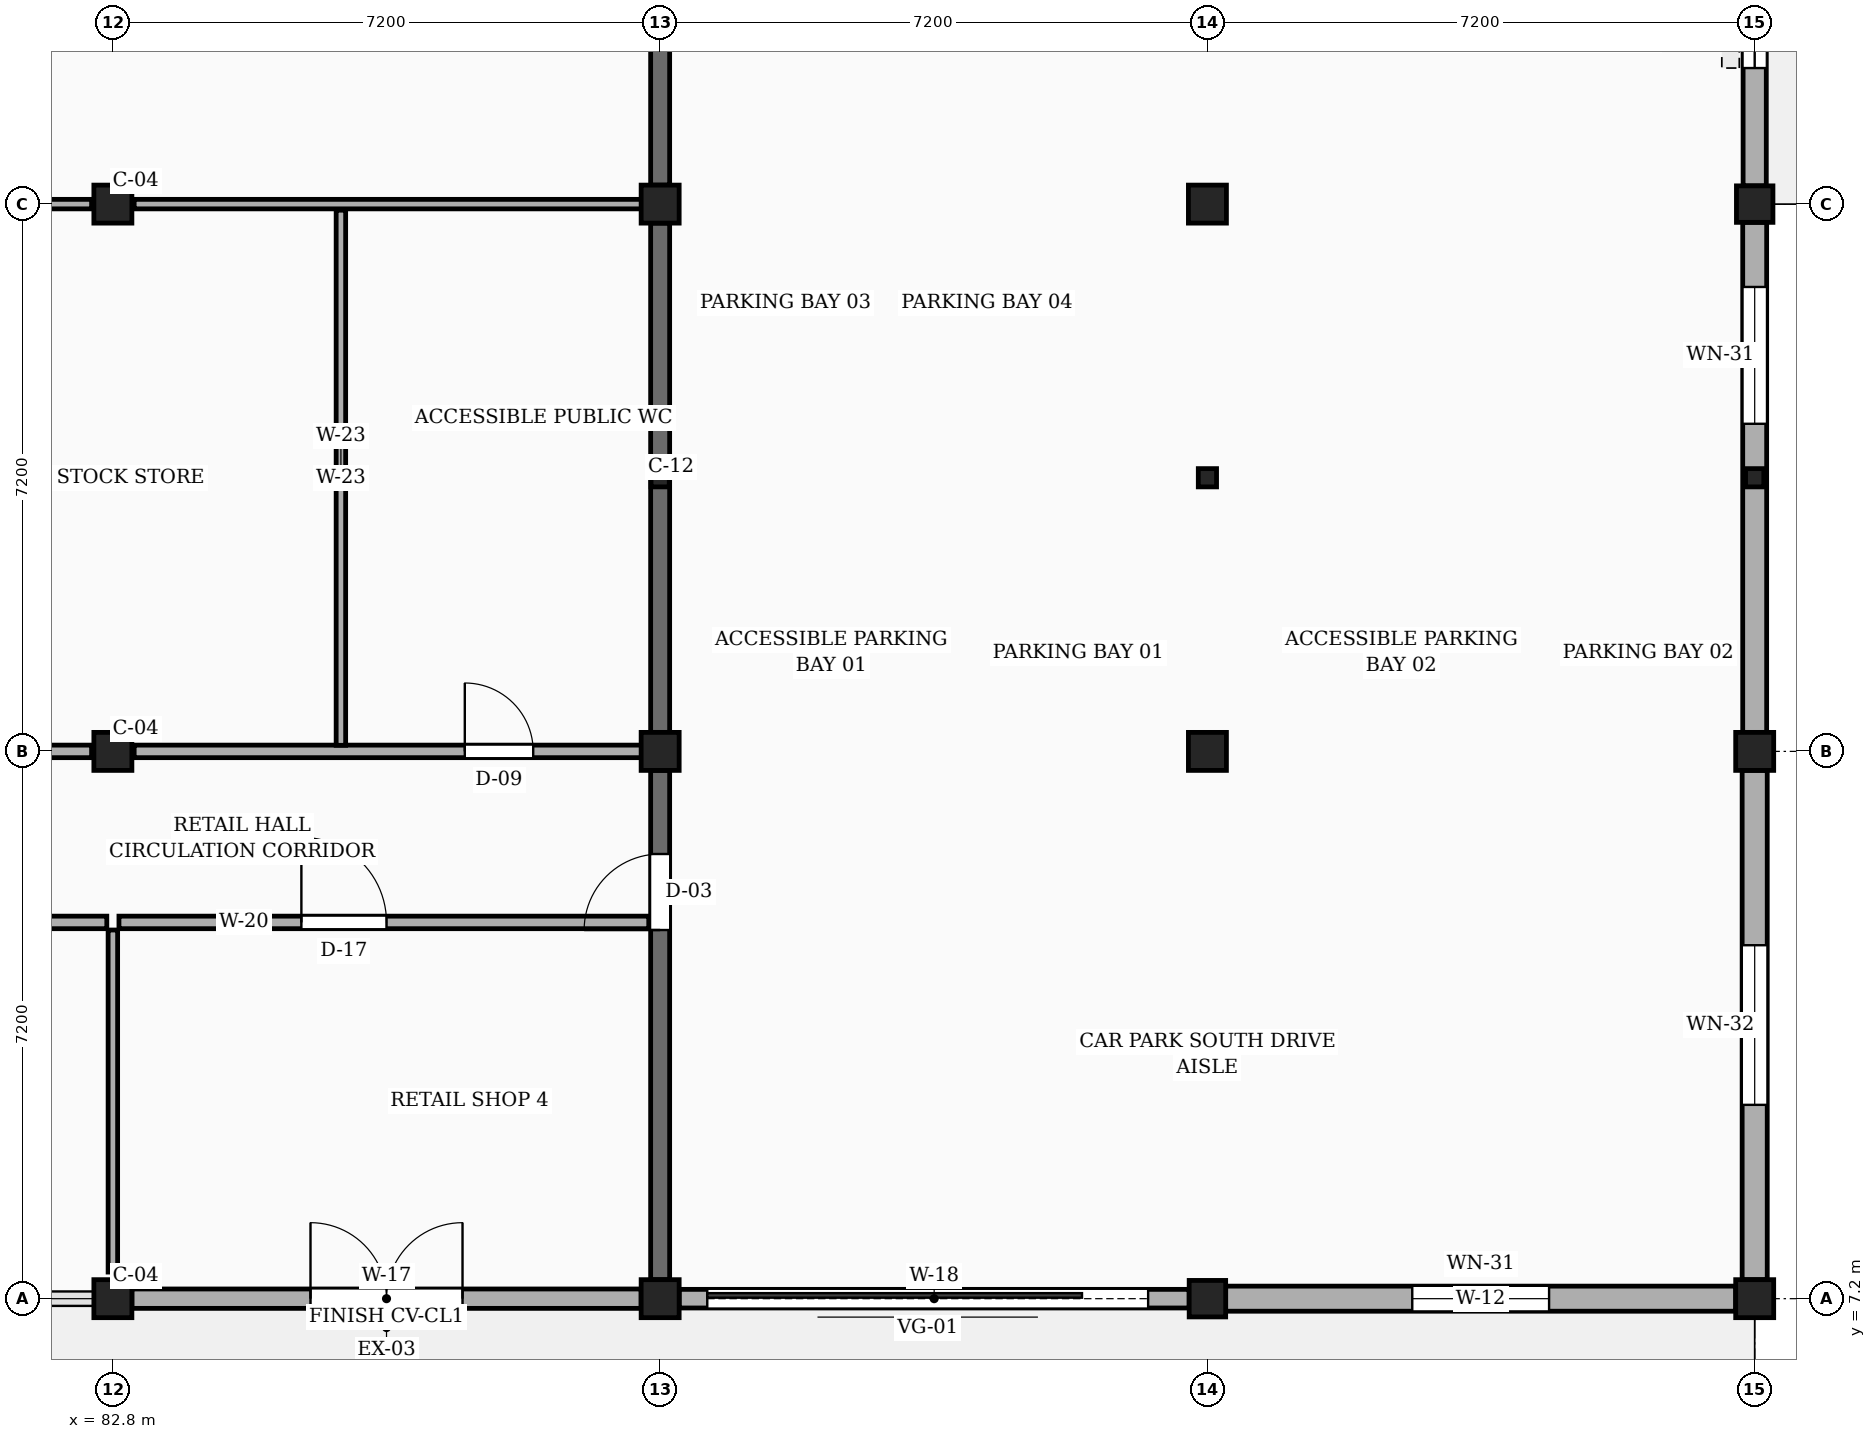
"""IFC4 building model, lengths in metres.
Left out: names, types, materials, properties, quantities, classifications, styles, units other than length and angle.
Written with IfcOpenShell. Run it as: python <this file> out.ifc"""

import sys

from ifc_helpers import new_model, si_unit, direction, frame, frame_2d, origin, origin_2d, place, context, subcontext, project, spatial, rectangle, i_section, extrude, element, fill, save


model = new_model("IFC4")
c1 = context("Model", 3, precision=1e-05, world=origin(), true_north=direction((0.0, 1.0)))
c2 = subcontext(c1, "Body", "Model", "MODEL_VIEW")
j1 = project(units=[si_unit("LENGTHUNIT", "METRE"), si_unit("PLANEANGLEUNIT", "RADIAN")], contexts=[c1])
p1 = place(None, origin())
s1 = spatial("IfcSite", under=j1, at=p1, CompositionType="ELEMENT")
p2 = place(p1, origin())
s2 = spatial("IfcBuilding", under=s1, at=p2, CompositionType="ELEMENT")
p3 = place(p2, origin())
s3 = spatial("IfcBuildingStorey", under=s2, at=p3, CompositionType="ELEMENT", Elevation=0.0)
for number, where, z_axis, x_axis in (
    (1, (82.8, 7.2, 0.0), (0.0, 0.0, 1.0), (1.0, 0.0, 0.0)),
    (2, (82.8, 14.4, 0.0), (0.0, 0.0, 1.0), (1.0, 0.0, 0.0)),
    (3, (82.8, 21.6, 0.0), (0.0, 0.0, 1.0), (1.0, 0.0, 0.0)),
    (4, (90.0, 7.2, 0.0), (0.0, 0.0, 1.0), (1.0, 0.0, 0.0)),
    (5, (90.0, 14.4, 0.0), (0.0, 0.0, 1.0), (1.0, 0.0, 0.0)),
    (6, (90.0, 21.6, 0.0), (0.0, 0.0, 1.0), (1.0, 0.0, 0.0)),
):
    element("IfcColumn", number, at=place(p3, frame(where, z_axis=z_axis, x_axis=x_axis)), inside=s3, PredefinedType="COLUMN", context=c2, shape_type="SweptSolid", body=[
        extrude(rectangle(XDim=0.5, YDim=0.5, at=origin_2d()), origin(), (0.0, 0.0, 1.0), 4.5),
    ])
p4 = place(p3, frame((97.2, 7.2, 0.0), z_axis=(0.0, 0.0, 1.0), x_axis=(1.0, 0.0, 0.0)))
e7 = element("IfcColumn", 7, at=p4, inside=s3, PredefinedType="PILASTER", context=c2, shape_type="SweptSolid", body=[
    extrude(rectangle(XDim=0.48, YDim=0.48, at=origin_2d()), origin(), (0.0, 0.0, 1.0), 4.5),
])
for number, where, z_axis, x_axis in (
    (8, (97.2, 14.4, 0.0), (0.0, 0.0, 1.0), (1.0, 0.0, 0.0)),
    (9, (97.2, 21.6, 0.0), (0.0, 0.0, 1.0), (1.0, 0.0, 0.0)),
):
    element("IfcColumn", number, at=place(p3, frame(where, z_axis=z_axis, x_axis=x_axis)), inside=s3, PredefinedType="COLUMN", context=c2, shape_type="SweptSolid", body=[
        extrude(rectangle(XDim=0.5, YDim=0.5, at=origin_2d()), origin(), (0.0, 0.0, 1.0), 6.067),
    ])
p5 = place(p3, frame((104.4, 7.2, 0.0), z_axis=(0.0, 0.0, 1.0), x_axis=(1.0, 0.0, 0.0)))
e10 = element("IfcColumn", 10, at=p5, inside=s3, PredefinedType="COLUMN", context=c2, shape_type="SweptSolid", body=[
    extrude(rectangle(XDim=0.5, YDim=0.5, at=origin_2d()), origin(), (0.0, 0.0, 1.0), 4.5),
])
p6 = place(p3, frame((104.4, 14.4, 0.0), z_axis=(0.0, 0.0, 1.0), x_axis=(1.0, 0.0, 0.0)))
e11 = element("IfcColumn", 11, at=p6, inside=s3, PredefinedType="COLUMN", context=c2, shape_type="SweptSolid", body=[
    extrude(rectangle(XDim=0.5, YDim=0.5, at=origin_2d()), origin(), (0.0, 0.0, 1.0), 6.067),
])
p7 = place(p3, frame((104.4, 21.6, 0.0), z_axis=(0.0, 0.0, 1.0), x_axis=(1.0, 0.0, 0.0)))
e12 = element("IfcColumn", 12, at=p7, inside=s3, PredefinedType="PILASTER", context=c2, shape_type="SweptSolid", body=[
    extrude(rectangle(XDim=0.48, YDim=0.48, at=origin_2d()), origin(), (0.0, 0.0, 1.0), 6.067),
])
for number, where, z_axis, x_axis in (
    (13, (90.0, 18.0, 0.0), (0.0, 0.0, 1.0), (1.0, 0.0, 0.0)),
    (14, (97.2, 18.0, 0.0), (0.0, 0.0, 1.0), (1.0, 0.0, 0.0)),
    (15, (104.4, 18.0, 0.0), (0.0, 0.0, 1.0), (1.0, 0.0, 0.0)),
):
    element("IfcColumn", number, at=place(p3, frame(where, z_axis=z_axis, x_axis=x_axis)), inside=s3, PredefinedType="COLUMN", context=c2, shape_type="SweptSolid", body=[
        extrude(i_section(OverallWidth=0.24, OverallDepth=0.24, WebThickness=0.01, FlangeThickness=0.017, FilletRadius=0.021, at=origin_2d()), origin(), (0.0, 0.0, 1.0), 4.5),
    ])
p8 = place(p3, frame((83.05, 7.2, 0.0), z_axis=(0.0, 0.0, 1.0), x_axis=(1.0, 0.0, 0.0)))
e16 = element("IfcWall", 16, at=p8, inside=s3, PredefinedType="SOLIDWALL", context=c2, shape_type="SweptSolid", body=[
    extrude(rectangle(XDim=6.7, YDim=0.255, at=frame_2d((3.35, 0.0))), origin(), (0.0, 0.0, 1.0), 3.83),
])
p9 = place(p8, frame((2.35, 0.0, 0.0)))
e17 = element("IfcOpeningElement", 17, at=p9, cuts=e16, PredefinedType="OPENING", context=c2, shape_type="SweptSolid", body=[
    extrude(rectangle(XDim=2.0, YDim=2.3, at=frame_2d((1.0, 1.15))), frame((0.0, 0.137, 0.0), z_axis=(0.0, -1.0, 0.0), x_axis=(1.0, 0.0, 0.0)), (0.0, 0.0, 1.0), 0.275),
])
p10 = place(p3, frame((90.25, 7.2, 0.0), z_axis=(0.0, 0.0, 1.0), x_axis=(1.0, 0.0, 0.0)))
e18 = element("IfcWall", 18, at=p10, inside=s3, PredefinedType="SOLIDWALL", context=c2, shape_type="SweptSolid", body=[
    extrude(rectangle(XDim=6.71, YDim=0.245, at=frame_2d((3.355, 0.0))), origin(), (0.0, 0.0, 1.0), 3.83),
])
p11 = place(p10, frame((0.37, 0.0, 0.0)))
e19 = element("IfcOpeningElement", 19, at=p11, cuts=e18, PredefinedType="OPENING", context=c2, shape_type="SweptSolid", body=[
    extrude(rectangle(XDim=5.8, YDim=3.1, at=frame_2d((2.9, 1.55))), frame((0.0, 0.133, 0.0), z_axis=(0.0, -1.0, 0.0), x_axis=(1.0, 0.0, 0.0)), (0.0, 0.0, 1.0), 0.265),
])
p12 = place(p3, frame((97.44, 7.2, 0.0), z_axis=(0.0, 0.0, 1.0), x_axis=(1.0, 0.0, 0.0)))
e20 = element("IfcWall", 20, at=p12, inside=s3, PredefinedType="SOLIDWALL", context=c2, shape_type="SweptSolid", body=[
    extrude(rectangle(XDim=6.71, YDim=0.33, at=frame_2d((3.355, 0.0))), origin(), (0.0, 0.0, 1.0), 3.83),
])
p13 = place(p12, frame((2.455, 0.0, 0.85)))
e21 = element("IfcOpeningElement", 21, at=p13, cuts=e20, PredefinedType="OPENING", context=c2, shape_type="SweptSolid", body=[
    extrude(rectangle(XDim=1.8, YDim=2.1, at=frame_2d((0.9, 1.05))), frame((0.0, 0.175, 0.0), z_axis=(0.0, -1.0, 0.0), x_axis=(1.0, 0.0, 0.0)), (0.0, 0.0, 1.0), 0.35),
])
p14 = place(p3, frame((104.4, 7.45, 0.0), z_axis=(0.0, 0.0, 1.0), x_axis=(0.0, 1.0, 0.0)))
e22 = element("IfcWall", 22, at=p14, inside=s3, PredefinedType="SOLIDWALL", context=c2, shape_type="SweptSolid", body=[
    extrude(rectangle(XDim=6.7, YDim=0.33, at=frame_2d((3.35, 0.0))), origin(), (0.0, 0.0, 1.0), 3.83),
])
p15 = place(p14, frame((2.3, 0.0, 0.85)))
e23 = element("IfcOpeningElement", 23, at=p15, cuts=e22, PredefinedType="OPENING", context=c2, shape_type="SweptSolid", body=[
    extrude(rectangle(XDim=2.1, YDim=2.1, at=frame_2d((1.05, 1.05))), frame((0.0, 0.175, 0.0), z_axis=(0.0, -1.0, 0.0), x_axis=(1.0, 0.0, 0.0)), (0.0, 0.0, 1.0), 0.35),
])
p16 = place(p3, frame((104.4, 14.65, 0.0), z_axis=(0.0, 0.0, 1.0), x_axis=(0.0, 1.0, 0.0)))
e24 = element("IfcWall", 24, at=p16, inside=s3, PredefinedType="SOLIDWALL", context=c2, shape_type="SweptSolid", body=[
    extrude(rectangle(XDim=6.71, YDim=0.315, at=frame_2d((3.355, 0.0))), origin(), (0.0, 0.0, 1.0), 3.83),
])
p17 = place(p16, frame((4.06, 0.0, 0.85)))
e25 = element("IfcOpeningElement", 25, at=p17, cuts=e24, PredefinedType="OPENING", context=c2, shape_type="SweptSolid", body=[
    extrude(rectangle(XDim=1.8, YDim=2.1, at=frame_2d((0.9, 1.05))), frame((0.0, 0.167, 0.0), z_axis=(0.0, -1.0, 0.0), x_axis=(1.0, 0.0, 0.0)), (0.0, 0.0, 1.0), 0.335),
])
p18 = place(p3, frame((104.4, 21.84, 0.0), z_axis=(0.0, 0.0, 1.0), x_axis=(0.0, 1.0, 0.0)))
e26 = element("IfcWall", 26, at=p18, inside=s3, PredefinedType="SOLIDWALL", context=c2, shape_type="SweptSolid", body=[
    extrude(rectangle(XDim=6.71, YDim=0.305, at=frame_2d((3.355, 0.0))), origin(), (0.0, 0.0, 1.0), 3.83),
])
p19 = place(p18, frame((1.55, 0.0, 0.0)))
e27 = element("IfcOpeningElement", 27, at=p19, cuts=e26, PredefinedType="OPENING", context=c2, shape_type="SweptSolid", body=[
    extrude(rectangle(XDim=3.4, YDim=3.1, at=frame_2d((1.7, 1.55))), frame((0.0, 0.163, 0.0), z_axis=(0.0, -1.0, 0.0), x_axis=(1.0, 0.0, 0.0)), (0.0, 0.0, 1.0), 0.325),
])
p20 = place(p3, frame((75.68, 12.15, 0.0), z_axis=(0.0, 0.0, 1.0), x_axis=(1.0, 0.0, 0.0)))
e28 = element("IfcWall", 28, at=p20, inside=s3, PredefinedType="PARTITIONING", context=c2, shape_type="SweptSolid", body=[
    extrude(rectangle(XDim=7.04, YDim=0.165, at=frame_2d((3.52, 0.0))), origin(), (0.0, 0.0, 1.0), 3.41),
])
p21 = place(p20, frame((2.4, 0.0, 0.0)))
e29 = element("IfcOpeningElement", 29, at=p21, cuts=e28, PredefinedType="OPENING", context=c2, shape_type="SweptSolid", body=[
    extrude(rectangle(XDim=1.12, YDim=2.18, at=frame_2d((0.56, 1.09))), frame((0.0, 0.093, 0.0), z_axis=(0.0, -1.0, 0.0), x_axis=(1.0, 0.0, 0.0)), (0.0, 0.0, 1.0), 0.185),
])
p22 = place(p3, frame((82.88, 12.15, 0.0), z_axis=(0.0, 0.0, 1.0), x_axis=(1.0, 0.0, 0.0)))
e30 = element("IfcWall", 30, at=p22, inside=s3, PredefinedType="PARTITIONING", context=c2, shape_type="SweptSolid", body=[
    extrude(rectangle(XDim=6.97, YDim=0.165, at=frame_2d((3.485, 0.0))), origin(), (0.0, 0.0, 1.0), 3.41),
])
p23 = place(p22, frame((2.4, 0.0, 0.0)))
e31 = element("IfcOpeningElement", 31, at=p23, cuts=e30, PredefinedType="OPENING", context=c2, shape_type="SweptSolid", body=[
    extrude(rectangle(XDim=1.12, YDim=2.18, at=frame_2d((0.56, 1.09))), frame((0.0, 0.093, 0.0), z_axis=(0.0, -1.0, 0.0), x_axis=(1.0, 0.0, 0.0)), (0.0, 0.0, 1.0), 0.185),
])
p24 = place(p3, frame((82.8, 7.55, 0.0), z_axis=(0.0, 0.0, 1.0), x_axis=(0.0, 1.0, 0.0)))
e32 = element("IfcWall", 32, at=p24, inside=s3, PredefinedType="PARTITIONING", context=c2, shape_type="SweptSolid", body=[
    extrude(rectangle(XDim=4.5, YDim=0.125, at=frame_2d((2.25, 0.0))), origin(), (0.0, 0.0, 1.0), 3.41),
])
p25 = place(p3, frame((79.22, 14.4, 0.0), z_axis=(0.0, 0.0, 1.0), x_axis=(1.0, 0.0, 0.0)))
e33 = element("IfcWall", 33, at=p25, inside=s3, PredefinedType="PARTITIONING", context=c2, shape_type="SweptSolid", body=[
    extrude(rectangle(XDim=3.3, YDim=0.165, at=frame_2d((1.65, 0.0))), origin(), (0.0, 0.0, 1.0), 3.41),
])
p26 = place(p25, frame((1.05, 0.0, 0.0)))
e34 = element("IfcOpeningElement", 34, at=p26, cuts=e33, PredefinedType="OPENING", context=c2, shape_type="SweptSolid", body=[
    extrude(rectangle(XDim=1.2, YDim=2.2, at=frame_2d((0.6, 1.1))), frame((0.0, 0.093, 0.0), z_axis=(0.0, -1.0, 0.0), x_axis=(1.0, 0.0, 0.0)), (0.0, 0.0, 1.0), 0.185),
])
p27 = place(p3, frame((83.08, 14.4, 0.0), z_axis=(0.0, 0.0, 1.0), x_axis=(1.0, 0.0, 0.0)))
e35 = element("IfcWall", 35, at=p27, inside=s3, PredefinedType="PARTITIONING", context=c2, shape_type="SweptSolid", body=[
    extrude(rectangle(XDim=6.77, YDim=0.165, at=frame_2d((3.385, 0.0))), origin(), (0.0, 0.0, 1.0), 3.41),
])
p28 = place(p27, frame((4.35, 0.0, 0.0)))
e36 = element("IfcOpeningElement", 36, at=p28, cuts=e35, PredefinedType="OPENING", context=c2, shape_type="SweptSolid", body=[
    extrude(rectangle(XDim=0.9, YDim=2.05, at=frame_2d((0.45, 1.025))), frame((0.0, 0.093, 0.0), z_axis=(0.0, -1.0, 0.0), x_axis=(1.0, 0.0, 0.0)), (0.0, 0.0, 1.0), 0.185),
])
p29 = place(p3, frame((85.8, 14.48, 0.0), z_axis=(0.0, 0.0, 1.0), x_axis=(0.0, 1.0, 0.0)))
e37 = element("IfcWall", 37, at=p29, inside=s3, PredefinedType="PARTITIONING", context=c2, shape_type="SweptSolid", body=[
    extrude(rectangle(XDim=7.04, YDim=0.125, at=frame_2d((3.52, 0.0))), origin(), (0.0, 0.0, 1.0), 3.41),
])
p30 = place(p3, frame((79.22, 21.6, 0.0), z_axis=(0.0, 0.0, 1.0), x_axis=(1.0, 0.0, 0.0)))
e38 = element("IfcWall", 38, at=p30, inside=s3, PredefinedType="PARTITIONING", context=c2, shape_type="SweptSolid", body=[
    extrude(rectangle(XDim=3.3, YDim=0.125, at=frame_2d((1.65, 0.0))), origin(), (0.0, 0.0, 1.0), 3.41),
])
p31 = place(p30, frame((1.05, 0.0, 0.0)))
e39 = element("IfcOpeningElement", 39, at=p31, cuts=e38, PredefinedType="OPENING", context=c2, shape_type="SweptSolid", body=[
    extrude(rectangle(XDim=1.0, YDim=2.14, at=frame_2d((0.5, 1.07))), frame((0.0, 0.073, 0.0), z_axis=(0.0, -1.0, 0.0), x_axis=(1.0, 0.0, 0.0)), (0.0, 0.0, 1.0), 0.145),
])
p32 = place(p3, frame((83.08, 21.6, 0.0), z_axis=(0.0, 0.0, 1.0), x_axis=(1.0, 0.0, 0.0)))
e40 = element("IfcWall", 40, at=p32, inside=s3, PredefinedType="PARTITIONING", context=c2, shape_type="SweptSolid", body=[
    extrude(rectangle(XDim=6.77, YDim=0.125, at=frame_2d((3.385, 0.0))), origin(), (0.0, 0.0, 1.0), 3.41),
])
p33 = place(p3, frame((90.0, 7.45, 0.0), z_axis=(0.0, 0.0, 1.0), x_axis=(0.0, 1.0, 0.0)))
e41 = element("IfcWall", 41, at=p33, inside=s3, PredefinedType="SHEAR", context=c2, shape_type="SweptSolid", body=[
    extrude(rectangle(XDim=6.7, YDim=0.25, at=frame_2d((3.35, 0.0))), origin(), (0.0, 0.0, 1.0), 3.85),
])
p34 = place(p33, frame((4.6, 0.0, 0.0)))
e42 = element("IfcOpeningElement", 42, at=p34, cuts=e41, PredefinedType="OPENING", context=c2, shape_type="SweptSolid", body=[
    extrude(rectangle(XDim=1.0, YDim=2.15, at=frame_2d((0.5, 1.075))), frame((0.0, 0.135, 0.0), z_axis=(0.0, -1.0, 0.0), x_axis=(1.0, 0.0, 0.0)), (0.0, 0.0, 1.0), 0.27),
])
p35 = place(p3, frame((90.0, 14.65, 0.0), z_axis=(0.0, 0.0, 1.0), x_axis=(0.0, 1.0, 0.0)))
e43 = element("IfcWall", 43, at=p35, inside=s3, PredefinedType="SHEAR", context=c2, shape_type="SweptSolid", body=[
    extrude(rectangle(XDim=6.7, YDim=0.25, at=frame_2d((3.35, 0.0))), origin(), (0.0, 0.0, 1.0), 3.85),
])
p36 = place(p3, frame((90.0, 21.85, 0.0), z_axis=(0.0, 0.0, 1.0), x_axis=(0.0, 1.0, 0.0)))
e44 = element("IfcWall", 44, at=p36, inside=s3, PredefinedType="SHEAR", context=c2, shape_type="SweptSolid", body=[
    extrude(rectangle(XDim=6.71, YDim=0.25, at=frame_2d((3.355, 0.0))), origin(), (0.0, 0.0, 1.0), 3.85),
])
p37 = place(p9, frame((2.0, 0.0, 0.0), z_axis=(0.0, 0.0, 1.0), x_axis=(-1.0, 0.0, 0.0)))
e45 = element("IfcDoor", 45, at=p37, inside=s3, OperationType="DOUBLE_DOOR_SINGLE_SWING", PredefinedType="DOOR", context=c2, shape_type="SweptSolid", body=[
    extrude(rectangle(XDim=2.0, YDim=2.3, at=frame_2d((1.0, 1.15))), frame((0.0, 0.025, 0.0), z_axis=(0.0, -1.0, 0.0), x_axis=(1.0, 0.0, 0.0)), (0.0, 0.0, 1.0), 0.05),
])
fill(e17, e45)
p38 = place(p11, frame((5.8, 0.0, 0.0), z_axis=(0.0, 0.0, 1.0), x_axis=(-1.0, 0.0, 0.0)))
e46 = element("IfcDoor", 46, at=p38, inside=s3, OperationType="SLIDING_TO_LEFT", PredefinedType="GATE", context=c2, shape_type="SweptSolid", body=[
    extrude(rectangle(XDim=5.8, YDim=3.1, at=frame_2d((2.9, 1.55))), frame((0.0, 0.025, 0.0), z_axis=(0.0, -1.0, 0.0), x_axis=(1.0, 0.0, 0.0)), (0.0, 0.0, 1.0), 0.05),
])
fill(e19, e46)
p39 = place(p13, origin())
e47 = element("IfcWindow", 47, at=p39, inside=s3, PartitioningType="SINGLE_PANEL", PredefinedType="WINDOW", context=c2, shape_type="SweptSolid", body=[
    extrude(rectangle(XDim=1.8, YDim=2.1, at=frame_2d((0.9, 1.05))), frame((0.0, 0.03, 0.0), z_axis=(0.0, -1.0, 0.0), x_axis=(1.0, 0.0, 0.0)), (0.0, 0.0, 1.0), 0.06),
])
fill(e21, e47)
p40 = place(p15, origin())
e48 = element("IfcWindow", 48, at=p40, inside=s3, PartitioningType="SINGLE_PANEL", PredefinedType="WINDOW", context=c2, shape_type="SweptSolid", body=[
    extrude(rectangle(XDim=2.1, YDim=2.1, at=frame_2d((1.05, 1.05))), frame((0.0, 0.03, 0.0), z_axis=(0.0, -1.0, 0.0), x_axis=(1.0, 0.0, 0.0)), (0.0, 0.0, 1.0), 0.06),
])
fill(e23, e48)
p41 = place(p17, origin())
e49 = element("IfcWindow", 49, at=p41, inside=s3, PartitioningType="SINGLE_PANEL", PredefinedType="WINDOW", context=c2, shape_type="SweptSolid", body=[
    extrude(rectangle(XDim=1.8, YDim=2.1, at=frame_2d((0.9, 1.05))), frame((0.0, 0.03, 0.0), z_axis=(0.0, -1.0, 0.0), x_axis=(1.0, 0.0, 0.0)), (0.0, 0.0, 1.0), 0.06),
])
fill(e25, e49)
p42 = place(p19, frame((3.4, 0.0, 0.0), z_axis=(0.0, 0.0, 1.0), x_axis=(-1.0, 0.0, 0.0)))
e50 = element("IfcDoor", 50, at=p42, inside=s3, OperationType="ROLLINGUP", PredefinedType="DOOR", context=c2, shape_type="SweptSolid", body=[
    extrude(rectangle(XDim=3.4, YDim=3.1, at=frame_2d((1.7, 1.55))), frame((0.0, 0.025, 0.0), z_axis=(0.0, -1.0, 0.0), x_axis=(1.0, 0.0, 0.0)), (0.0, 0.0, 1.0), 0.05),
])
fill(e27, e50)
p43 = place(p23, origin())
e51 = element("IfcDoor", 51, at=p43, inside=s3, OperationType="SINGLE_SWING_LEFT", PredefinedType="DOOR", context=c2, shape_type="SweptSolid", body=[
    extrude(rectangle(XDim=1.12, YDim=2.18, at=frame_2d((0.56, 1.09))), frame((0.0, 0.025, 0.0), z_axis=(0.0, -1.0, 0.0), x_axis=(1.0, 0.0, 0.0)), (0.0, 0.0, 1.0), 0.05),
])
fill(e31, e51)
p44 = place(p28, origin())
e52 = element("IfcDoor", 52, at=p44, inside=s3, OperationType="SINGLE_SWING_LEFT", PredefinedType="DOOR", context=c2, shape_type="SweptSolid", body=[
    extrude(rectangle(XDim=0.9, YDim=2.05, at=frame_2d((0.45, 1.025))), frame((0.0, 0.025, 0.0), z_axis=(0.0, -1.0, 0.0), x_axis=(1.0, 0.0, 0.0)), (0.0, 0.0, 1.0), 0.05),
])
fill(e36, e52)
p45 = place(p34, origin())
e53 = element("IfcDoor", 53, at=p45, inside=s3, OperationType="SINGLE_SWING_LEFT", PredefinedType="DOOR", context=c2, shape_type="SweptSolid", body=[
    extrude(rectangle(XDim=1.0, YDim=2.15, at=frame_2d((0.5, 1.075))), frame((0.0, 0.025, 0.0), z_axis=(0.0, -1.0, 0.0), x_axis=(1.0, 0.0, 0.0)), (0.0, 0.0, 1.0), 0.05),
])
fill(e42, e53)
save(model, sys.argv[1])
